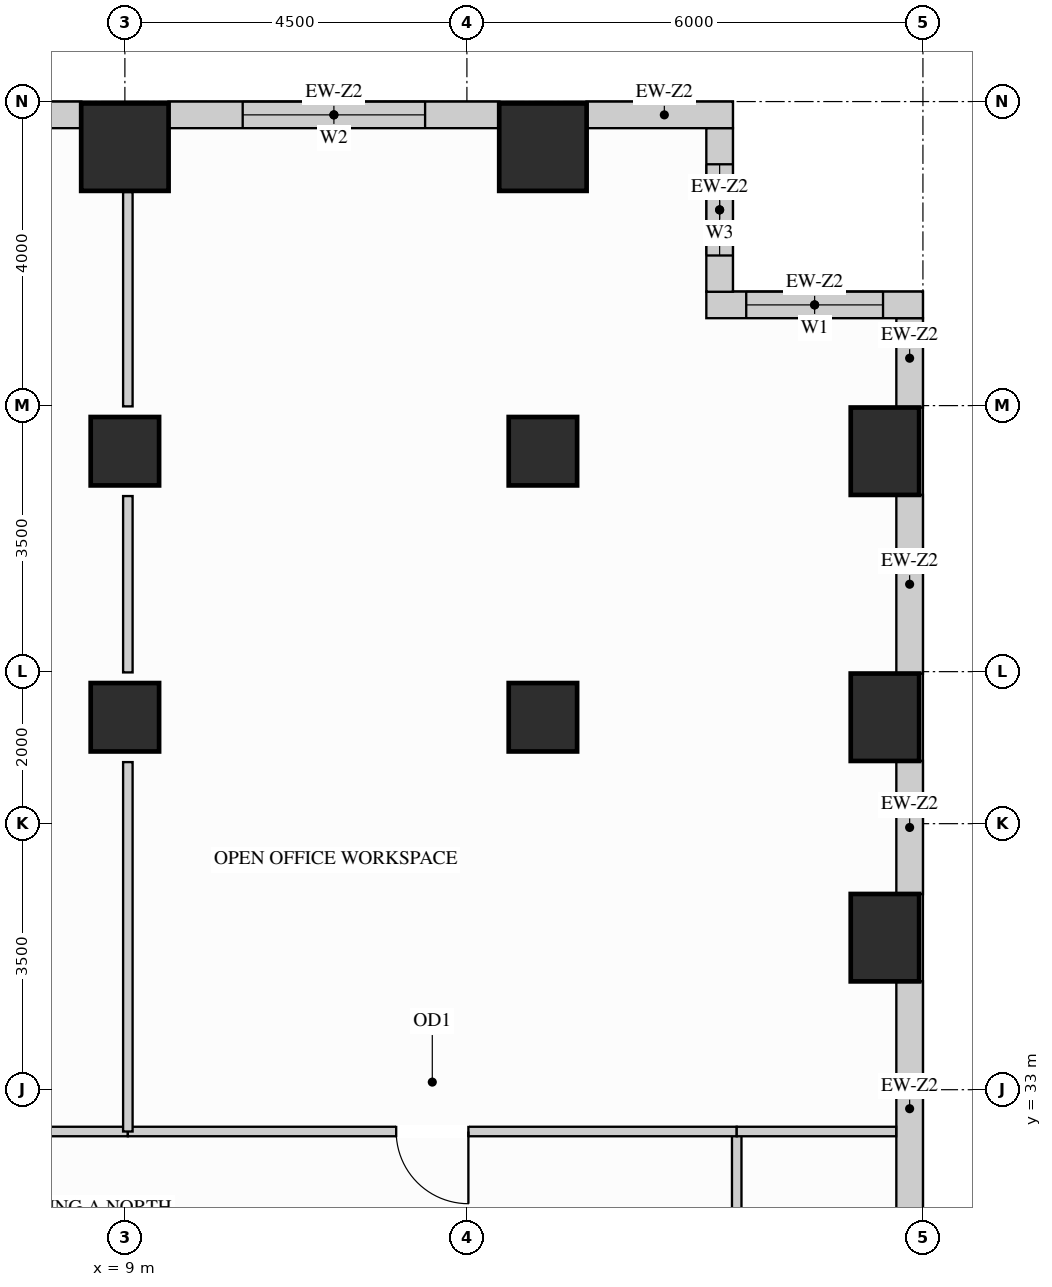
"""IFC4 building model, lengths in metres.
Left out: names, types, materials, properties, quantities, classifications, styles, units other than length and angle.
Written with IfcOpenShell. Run it as: python <this file> out.ifc"""

import sys

from ifc_helpers import new_model, si_unit, direction, frame, frame_2d, origin, origin_2d, place, context, subcontext, project, spatial, rectangle, extrude, source, transform, mapped, element, fill, save


model = new_model("IFC4")
c1 = context("Model", 3, precision=1e-05, world=origin(), true_north=direction((0.0, 1.0)))
c2 = subcontext(c1, "Body", "Model", "MODEL_VIEW")
j1 = project(units=[si_unit("LENGTHUNIT", "METRE"), si_unit("PLANEANGLEUNIT", "RADIAN")], contexts=[c1])
p1 = place(None, origin())
s1 = spatial("IfcSite", under=j1, at=p1, CompositionType="ELEMENT")
p2 = place(p1, origin())
s2 = spatial("IfcBuilding", under=s1, at=p2, CompositionType="ELEMENT")
p3 = place(p2, frame((0.0, 0.0, 106.2)))
s3 = spatial("IfcBuildingStorey", under=s2, at=p3, CompositionType="ELEMENT", Elevation=106.2)
m1 = source(origin(), c2, "Body", "SweptSolid", [
    extrude(rectangle(XDim=0.9, YDim=0.9, at=origin_2d()), origin(), (0.0, 0.0, 1.0), 3.38),
])
for number, where, z_axis, x_axis in (
    (1, (14.5, 37.9, 0.0), (0.0, 0.0, 1.0), (1.0, 0.0, 0.0)),
    (2, (14.5, 41.4, 0.0), (0.0, 0.0, 1.0), (1.0, 0.0, 0.0)),
    (3, (9.0, 37.9, 0.0), (0.0, 0.0, 1.0), (1.0, 0.0, 0.0)),
    (4, (9.0, 41.4, 0.0), (0.0, 0.0, 1.0), (1.0, 0.0, 0.0)),
):
    element("IfcColumn", number, at=place(p3, frame(where, z_axis=z_axis, x_axis=x_axis)), inside=s3, PredefinedType="COLUMN", context=c2, shape_type="MappedRepresentation", body=[
        mapped(m1, transform((0.0, 0.0, 0.0), x_axis=(1.0, 0.0, 0.0), y_axis=(0.0, 1.0, 0.0), z_axis=(0.0, 0.0, 1.0))),
    ])
m2 = source(origin(), c2, "Body", "SweptSolid", [
    extrude(rectangle(XDim=0.9, YDim=1.15, at=origin_2d()), origin(), (0.0, 0.0, 1.0), 3.38),
])
for number, where, z_axis, x_axis in (
    (5, (19.0, 35.0, 0.0), (0.0, 0.0, 1.0), (1.0, 0.0, 0.0)),
    (6, (19.0, 37.9, 0.0), (0.0, 0.0, 1.0), (1.0, 0.0, 0.0)),
    (7, (19.0, 41.4, 0.0), (0.0, 0.0, 1.0), (1.0, 0.0, 0.0)),
):
    element("IfcColumn", number, at=place(p3, frame(where, z_axis=z_axis, x_axis=x_axis)), inside=s3, PredefinedType="COLUMN", context=c2, shape_type="MappedRepresentation", body=[
        mapped(m2, transform((0.0, 0.0, 0.0), x_axis=(1.0, 0.0, 0.0), y_axis=(0.0, 1.0, 0.0), z_axis=(0.0, 0.0, 1.0))),
    ])
m3 = source(origin(), c2, "Body", "SweptSolid", [
    extrude(rectangle(XDim=1.15, YDim=1.15, at=origin_2d()), origin(), (0.0, 0.0, 1.0), 3.38),
])
for number, where, z_axis, x_axis in (
    (8, (14.5, 45.4, 0.0), (0.0, 0.0, 1.0), (1.0, 0.0, 0.0)),
    (9, (9.0, 45.4, 0.0), (0.0, 0.0, 1.0), (1.0, 0.0, 0.0)),
):
    element("IfcColumn", number, at=place(p3, frame(where, z_axis=z_axis, x_axis=x_axis)), inside=s3, PredefinedType="COLUMN", context=c2, shape_type="MappedRepresentation", body=[
        mapped(m3, transform((0.0, 0.0, 0.0), x_axis=(1.0, 0.0, 0.0), y_axis=(0.0, 1.0, 0.0), z_axis=(0.0, 0.0, 1.0))),
    ])
m4 = source(origin(), c2, "Body", "SweptSolid", [
    extrude(rectangle(XDim=3.354, YDim=0.35, at=frame_2d((1.677, 0.0))), origin(), (0.0, 0.0, 1.0), 2.519),
])
p4 = place(p3, frame((19.325, 31.073, 0.0), z_axis=(0.0, 0.0, 1.0), x_axis=(0.0, 1.0, 0.0)))
e10 = element("IfcWall", 10, at=p4, inside=s3, PredefinedType="SOLIDWALL", context=c2, shape_type="MappedRepresentation", body=[
    mapped(m4, transform((0.0, 0.0, 0.0), x_axis=(1.0, 0.0, 0.0), y_axis=(0.0, 1.0, 0.0), z_axis=(0.0, 0.0, 1.0))),
])
m5 = source(origin(), c2, "Body", "SweptSolid", [
    extrude(rectangle(XDim=1.754, YDim=0.35, at=frame_2d((0.877, 0.0))), origin(), (0.0, 0.0, 1.0), 2.519),
])
p5 = place(p3, frame((19.325, 35.573, 0.0), z_axis=(0.0, 0.0, 1.0), x_axis=(0.0, 1.0, 0.0)))
e11 = element("IfcWall", 11, at=p5, inside=s3, PredefinedType="SOLIDWALL", context=c2, shape_type="MappedRepresentation", body=[
    mapped(m5, transform((0.0, 0.0, 0.0), x_axis=(1.0, 0.0, 0.0), y_axis=(0.0, 1.0, 0.0), z_axis=(0.0, 0.0, 1.0))),
])
m6 = source(origin(), c2, "Body", "SweptSolid", [
    extrude(rectangle(XDim=2.354, YDim=0.35, at=frame_2d((1.177, 0.0))), origin(), (0.0, 0.0, 1.0), 2.519),
])
p6 = place(p3, frame((19.325, 38.473, 0.0), z_axis=(0.0, 0.0, 1.0), x_axis=(0.0, 1.0, 0.0)))
e12 = element("IfcWall", 12, at=p6, inside=s3, PredefinedType="SOLIDWALL", context=c2, shape_type="MappedRepresentation", body=[
    mapped(m6, transform((0.0, 0.0, 0.0), x_axis=(1.0, 0.0, 0.0), y_axis=(0.0, 1.0, 0.0), z_axis=(0.0, 0.0, 1.0))),
])
m7 = source(origin(), c2, "Body", "SweptSolid", [
    extrude(rectangle(XDim=1.179, YDim=0.35, at=frame_2d((0.59, 0.0))), origin(), (0.0, 0.0, 1.0), 3.365),
])
p7 = place(p3, frame((19.325, 41.973, 0.0), z_axis=(0.0, 0.0, 1.0), x_axis=(0.0, 1.0, 0.0)))
e13 = element("IfcWall", 13, at=p7, inside=s3, PredefinedType="SOLIDWALL", context=c2, shape_type="MappedRepresentation", body=[
    mapped(m7, transform((0.0, 0.0, 0.0), x_axis=(1.0, 0.0, 0.0), y_axis=(0.0, 1.0, 0.0), z_axis=(0.0, 0.0, 1.0))),
])
p8 = place(p3, frame((19.5, 43.325, 0.0), z_axis=(0.0, 0.0, 1.0), x_axis=(-1.0, 0.0, 0.0)))
e14 = element("IfcWall", 14, at=p8, inside=s3, PredefinedType="SOLIDWALL", context=c2, shape_type="SweptSolid", body=[
    extrude(rectangle(XDim=2.85, YDim=0.35, at=frame_2d((1.425, 0.0))), origin(), (0.0, 0.0, 1.0), 3.365),
])
p9 = place(p8, frame((0.525, 0.0, 0.78)))
e15 = element("IfcOpeningElement", 15, at=p9, cuts=e14, PredefinedType="OPENING", context=c2, shape_type="SweptSolid", body=[
    extrude(rectangle(XDim=1.8, YDim=2.1, at=frame_2d((0.9, 1.05))), frame((0.0, 0.185, 0.0), z_axis=(0.0, -1.0, 0.0), x_axis=(1.0, 0.0, 0.0)), (0.0, 0.0, 1.0), 0.37),
])
p10 = place(p3, frame((16.825, 43.498, 0.0), z_axis=(0.0, 0.0, 1.0), x_axis=(0.0, 1.0, 0.0)))
e16 = element("IfcWall", 16, at=p10, inside=s3, PredefinedType="SOLIDWALL", context=c2, shape_type="SweptSolid", body=[
    extrude(rectangle(XDim=2.154, YDim=0.35, at=frame_2d((1.077, 0.0))), origin(), (0.0, 0.0, 1.0), 3.365),
])
p11 = place(p10, frame((0.477, 0.0, 0.78)))
e17 = element("IfcOpeningElement", 17, at=p11, cuts=e16, PredefinedType="OPENING", context=c2, shape_type="SweptSolid", body=[
    extrude(rectangle(XDim=1.2, YDim=2.1, at=frame_2d((0.6, 1.05))), frame((0.0, 0.185, 0.0), z_axis=(0.0, -1.0, 0.0), x_axis=(1.0, 0.0, 0.0)), (0.0, 0.0, 1.0), 0.37),
])
m8 = source(origin(), c2, "Body", "SweptSolid", [
    extrude(rectangle(XDim=1.927, YDim=0.35, at=frame_2d((0.963, 0.0))), origin(), (0.0, 0.0, 1.0), 3.365),
])
p12 = place(p3, frame((17.0, 45.825, 0.0), z_axis=(0.0, 0.0, 1.0), x_axis=(-1.0, 0.0, 0.0)))
e18 = element("IfcWall", 18, at=p12, inside=s3, PredefinedType="SOLIDWALL", context=c2, shape_type="MappedRepresentation", body=[
    mapped(m8, transform((0.0, 0.0, 0.0), x_axis=(1.0, 0.0, 0.0), y_axis=(0.0, 1.0, 0.0), z_axis=(0.0, 0.0, 1.0))),
])
p13 = place(p3, frame((13.927, 45.825, 0.0), z_axis=(0.0, 0.0, 1.0), x_axis=(-1.0, 0.0, 0.0)))
e19 = element("IfcWall", 19, at=p13, inside=s3, PredefinedType="SOLIDWALL", context=c2, shape_type="SweptSolid", body=[
    extrude(rectangle(XDim=4.354, YDim=0.35, at=frame_2d((2.177, 0.0))), origin(), (0.0, 0.0, 1.0), 3.365),
])
p14 = place(p13, frame((0.977, 0.0, 0.78)))
e20 = element("IfcOpeningElement", 20, at=p14, cuts=e19, PredefinedType="OPENING", context=c2, shape_type="SweptSolid", body=[
    extrude(rectangle(XDim=2.4, YDim=2.1, at=frame_2d((1.2, 1.05))), frame((0.0, 0.185, 0.0), z_axis=(0.0, -1.0, 0.0), x_axis=(1.0, 0.0, 0.0)), (0.0, 0.0, 1.0), 0.37),
])
p15 = place(p3, frame((8.427, 45.825, 0.0), z_axis=(0.0, 0.0, 1.0), x_axis=(-1.0, 0.0, 0.0)))
e21 = element("IfcWall", 21, at=p15, inside=s3, PredefinedType="SOLIDWALL", context=c2, shape_type="SweptSolid", body=[
    extrude(rectangle(XDim=4.354, YDim=0.35, at=frame_2d((2.177, 0.0))), origin(), (0.0, 0.0, 1.0), 3.365),
])
p16 = place(p15, frame((0.977, 0.0, 0.78)))
e22 = element("IfcOpeningElement", 22, at=p16, cuts=e21, PredefinedType="OPENING", context=c2, shape_type="SweptSolid", body=[
    extrude(rectangle(XDim=2.4, YDim=2.1, at=frame_2d((1.2, 1.05))), frame((0.0, 0.185, 0.0), z_axis=(0.0, -1.0, 0.0), x_axis=(1.0, 0.0, 0.0)), (0.0, 0.0, 1.0), 0.37),
])
p17 = place(p3, frame((17.05, 26.05, 0.0), z_axis=(0.0, 0.0, 1.0), x_axis=(0.0, 1.0, 0.0)))
e23 = element("IfcWall", 23, at=p17, inside=s3, PredefinedType="PARTITIONING", context=c2, shape_type="SweptSolid", body=[
    extrude(rectangle(XDim=6.4, YDim=0.125, at=frame_2d((3.2, 0.0))), origin(), (0.0, 0.0, 1.0), 3.365),
])
p18 = place(p17, frame((2.725, 0.0, 0.0)))
e24 = element("IfcOpeningElement", 24, at=p18, cuts=e23, PredefinedType="OPENING", context=c2, shape_type="SweptSolid", body=[
    extrude(rectangle(XDim=0.95, YDim=2.15, at=frame_2d((0.475, 1.075))), frame((0.0, 0.073, 0.0), z_axis=(0.0, -1.0, 0.0), x_axis=(1.0, 0.0, 0.0)), (0.0, 0.0, 1.0), 0.145),
])
p19 = place(p3, frame((2.45, 32.45, 0.0), z_axis=(0.0, 0.0, 1.0), x_axis=(1.0, 0.0, 0.0)))
e25 = element("IfcWall", 25, at=p19, inside=s3, PredefinedType="PARTITIONING", context=c2, shape_type="SweptSolid", body=[
    extrude(rectangle(XDim=6.589, YDim=0.125, at=frame_2d((3.294, 0.0))), origin(), (0.0, 0.0, 1.0), 3.365),
])
p20 = place(p19, frame((2.82, 0.0, 0.0)))
e26 = element("IfcOpeningElement", 26, at=p20, cuts=e25, PredefinedType="OPENING", context=c2, shape_type="SweptSolid", body=[
    extrude(rectangle(XDim=0.95, YDim=2.15, at=frame_2d((0.475, 1.075))), frame((0.0, 0.073, 0.0), z_axis=(0.0, -1.0, 0.0), x_axis=(1.0, 0.0, 0.0)), (0.0, 0.0, 1.0), 0.145),
])
p21 = place(p3, frame((9.039, 32.45, 0.0), z_axis=(0.0, 0.0, 1.0), x_axis=(1.0, 0.0, 0.0)))
e27 = element("IfcWall", 27, at=p21, inside=s3, PredefinedType="PARTITIONING", context=c2, shape_type="SweptSolid", body=[
    extrude(rectangle(XDim=8.011, YDim=0.125, at=frame_2d((4.005, 0.0))), origin(), (0.0, 0.0, 1.0), 3.365),
])
p22 = place(p21, frame((3.531, 0.0, 0.0)))
e28 = element("IfcOpeningElement", 28, at=p22, cuts=e27, PredefinedType="OPENING", context=c2, shape_type="SweptSolid", body=[
    extrude(rectangle(XDim=0.95, YDim=2.15, at=frame_2d((0.475, 1.075))), frame((0.0, 0.073, 0.0), z_axis=(0.0, -1.0, 0.0), x_axis=(1.0, 0.0, 0.0)), (0.0, 0.0, 1.0), 0.145),
])
m9 = source(origin(), c2, "Body", "SweptSolid", [
    extrude(rectangle(XDim=2.098, YDim=0.125, at=frame_2d((1.049, 0.0))), origin(), (0.0, 0.0, 1.0), 3.365),
])
p23 = place(p3, frame((17.05, 32.45, 0.0), z_axis=(0.0, 0.0, 1.0), x_axis=(1.0, 0.0, 0.0)))
e29 = element("IfcWall", 29, at=p23, inside=s3, PredefinedType="PARTITIONING", context=c2, shape_type="MappedRepresentation", body=[
    mapped(m9, transform((0.0, 0.0, 0.0), x_axis=(1.0, 0.0, 0.0), y_axis=(0.0, 1.0, 0.0), z_axis=(0.0, 0.0, 1.0))),
])
m10 = source(origin(), c2, "Body", "SweptSolid", [
    extrude(rectangle(XDim=4.86, YDim=0.125, at=frame_2d((2.43, 0.0))), origin(), (0.0, 0.0, 1.0), 3.365),
])
p24 = place(p3, frame((9.039, 32.45, 0.0), z_axis=(0.0, 0.0, 1.0), x_axis=(0.0, 1.0, 0.0)))
e30 = element("IfcWall", 30, at=p24, inside=s3, PredefinedType="PARTITIONING", context=c2, shape_type="MappedRepresentation", body=[
    mapped(m10, transform((0.0, 0.0, 0.0), x_axis=(1.0, 0.0, 0.0), y_axis=(0.0, 1.0, 0.0), z_axis=(0.0, 0.0, 1.0))),
])
m11 = source(origin(), c2, "Body", "SweptSolid", [
    extrude(rectangle(XDim=2.32, YDim=0.125, at=frame_2d((1.16, 0.0))), origin(), (0.0, 0.0, 1.0), 2.677),
])
p25 = place(p3, frame((9.039, 38.49, 0.0), z_axis=(0.0, 0.0, 1.0), x_axis=(0.0, 1.0, 0.0)))
e31 = element("IfcWall", 31, at=p25, inside=s3, PredefinedType="PARTITIONING", context=c2, shape_type="MappedRepresentation", body=[
    mapped(m11, transform((0.0, 0.0, 0.0), x_axis=(1.0, 0.0, 0.0), y_axis=(0.0, 1.0, 0.0), z_axis=(0.0, 0.0, 1.0))),
])
m12 = source(origin(), c2, "Body", "SweptSolid", [
    extrude(rectangle(XDim=2.82, YDim=0.125, at=frame_2d((1.41, 0.0))), origin(), (0.0, 0.0, 1.0), 2.677),
])
p26 = place(p3, frame((9.039, 41.99, 0.0), z_axis=(0.0, 0.0, 1.0), x_axis=(0.0, 1.0, 0.0)))
e32 = element("IfcWall", 32, at=p26, inside=s3, PredefinedType="PARTITIONING", context=c2, shape_type="MappedRepresentation", body=[
    mapped(m12, transform((0.0, 0.0, 0.0), x_axis=(1.0, 0.0, 0.0), y_axis=(0.0, 1.0, 0.0), z_axis=(0.0, 0.0, 1.0))),
])
m13 = source(origin(), c2, "Body", "SweptSolid", [
    extrude(rectangle(XDim=0.95, YDim=2.15, at=frame_2d((0.475, 1.075))), frame((0.0, 0.025, 0.0), z_axis=(0.0, -1.0, 0.0), x_axis=(1.0, 0.0, 0.0)), (0.0, 0.0, 1.0), 0.05),
])
p27 = place(p22, origin())
e33 = element("IfcDoor", 33, at=p27, inside=s3, OperationType="SINGLE_SWING_RIGHT", PredefinedType="DOOR", context=c2, shape_type="MappedRepresentation", body=[
    mapped(m13, transform((0.0, 0.0, 0.0), x_axis=(1.0, 0.0, 0.0), y_axis=(0.0, 1.0, 0.0), z_axis=(0.0, 0.0, 1.0))),
])
fill(e28, e33)
m14 = source(origin(), c2, "Body", "SweptSolid", [
    extrude(rectangle(XDim=1.8, YDim=2.1, at=frame_2d((0.9, 1.05))), frame((0.0, 0.03, 0.0), z_axis=(0.0, -1.0, 0.0), x_axis=(1.0, 0.0, 0.0)), (0.0, 0.0, 1.0), 0.06),
])
p28 = place(p9, origin())
e34 = element("IfcWindow", 34, at=p28, inside=s3, PartitioningType="SINGLE_PANEL", PredefinedType="WINDOW", context=c2, shape_type="MappedRepresentation", body=[
    mapped(m14, transform((0.0, 0.0, 0.0), x_axis=(1.0, 0.0, 0.0), y_axis=(0.0, 1.0, 0.0), z_axis=(0.0, 0.0, 1.0))),
])
fill(e15, e34)
m15 = source(origin(), c2, "Body", "SweptSolid", [
    extrude(rectangle(XDim=2.4, YDim=2.1, at=frame_2d((1.2, 1.05))), frame((0.0, 0.03, 0.0), z_axis=(0.0, -1.0, 0.0), x_axis=(1.0, 0.0, 0.0)), (0.0, 0.0, 1.0), 0.06),
])
p29 = place(p14, origin())
e35 = element("IfcWindow", 35, at=p29, inside=s3, PartitioningType="SINGLE_PANEL", PredefinedType="WINDOW", context=c2, shape_type="MappedRepresentation", body=[
    mapped(m15, transform((0.0, 0.0, 0.0), x_axis=(1.0, 0.0, 0.0), y_axis=(0.0, 1.0, 0.0), z_axis=(0.0, 0.0, 1.0))),
])
fill(e20, e35)
m16 = source(origin(), c2, "Body", "SweptSolid", [
    extrude(rectangle(XDim=1.2, YDim=2.1, at=frame_2d((0.6, 1.05))), frame((0.0, 0.03, 0.0), z_axis=(0.0, -1.0, 0.0), x_axis=(1.0, 0.0, 0.0)), (0.0, 0.0, 1.0), 0.06),
])
p30 = place(p11, origin())
e36 = element("IfcWindow", 36, at=p30, inside=s3, PartitioningType="SINGLE_PANEL", PredefinedType="WINDOW", context=c2, shape_type="MappedRepresentation", body=[
    mapped(m16, transform((0.0, 0.0, 0.0), x_axis=(1.0, 0.0, 0.0), y_axis=(0.0, 1.0, 0.0), z_axis=(0.0, 0.0, 1.0))),
])
fill(e17, e36)
save(model, sys.argv[1])
